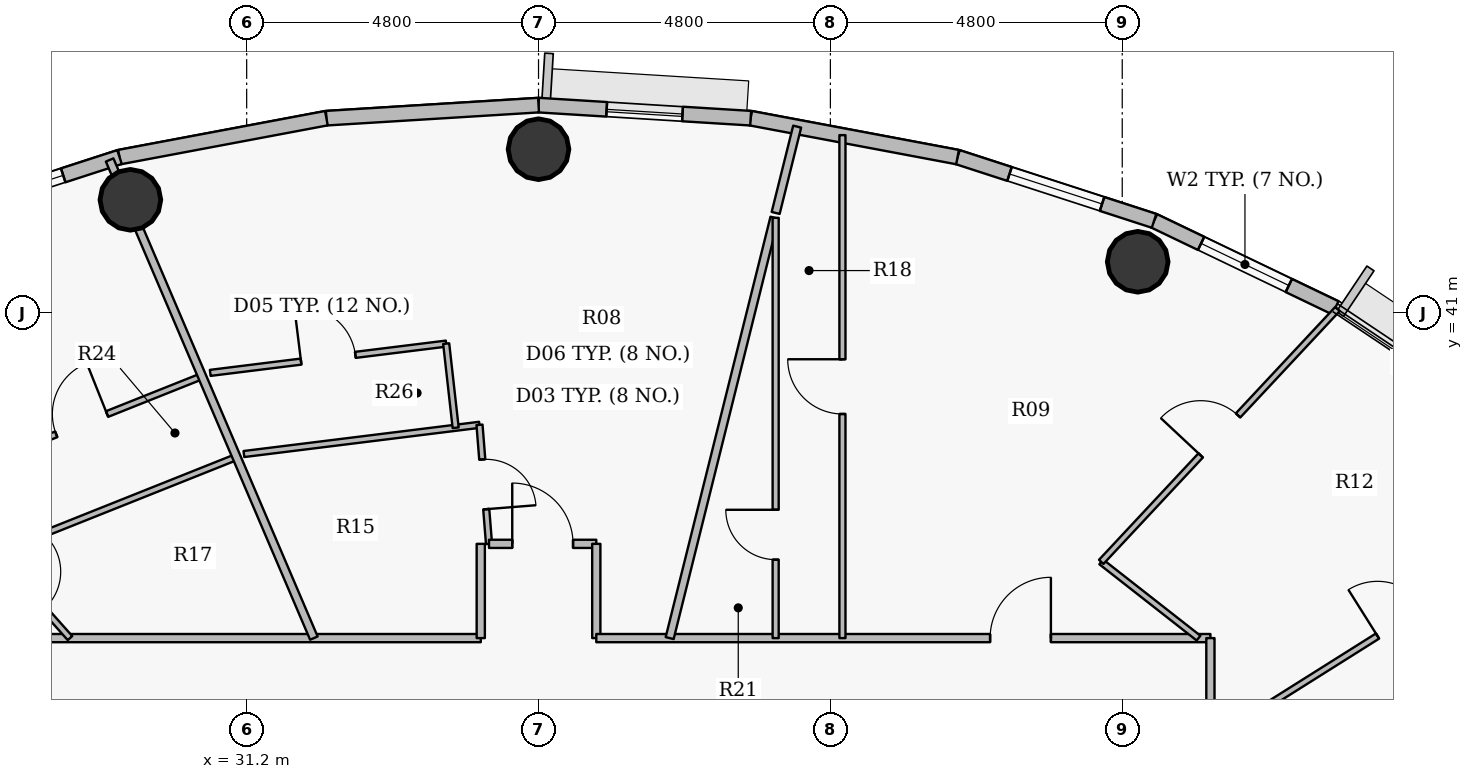
"""IFC4 building model, lengths in metres.
Left out: names, types, materials, properties, quantities, classifications, styles, units other than length and angle.
Written with IfcOpenShell. Run it as: python <this file> out.ifc"""

import sys

from ifc_helpers import new_model, si_unit, direction, frame, frame_2d, origin, origin_2d, place, context, subcontext, project, spatial, rectangle, hollow_circle, extrude, source, transform, mapped, element, fill, save


model = new_model("IFC4")
c1 = context("Model", 3, precision=1e-05, world=origin(), true_north=direction((0.0, 1.0)))
c2 = subcontext(c1, "Body", "Model", "MODEL_VIEW")
j1 = project(units=[si_unit("LENGTHUNIT", "METRE"), si_unit("PLANEANGLEUNIT", "RADIAN")], contexts=[c1])
p1 = place(None, origin())
s1 = spatial("IfcSite", under=j1, at=p1, CompositionType="ELEMENT")
p2 = place(p1, origin())
s2 = spatial("IfcBuilding", under=s1, at=p2, CompositionType="ELEMENT")
p3 = place(p2, frame((0.0, 0.0, 303.0)))
s3 = spatial("IfcBuildingStorey", under=s2, at=p3, CompositionType="ELEMENT", Elevation=303.0)
for number, where, z_axis, x_axis in (
    (1, (45.854, 41.839, 0.0), (0.0, 0.0, 1.0), (1.0, 0.0, 0.0)),
    (2, (36.0, 43.69, 0.0), (0.0, 0.0, 1.0), (1.0, 0.0, 0.0)),
    (3, (29.288, 42.858, 0.0), (0.0, 0.0, 1.0), (1.0, 0.0, 0.0)),
):
    element("IfcColumn", number, at=place(p3, frame(where, z_axis=z_axis, x_axis=x_axis)), inside=s3, PredefinedType="COLUMN", context=c2, shape_type="SweptSolid", body=[
        extrude(hollow_circle(Radius=0.5, WallThickness=0.032, at=origin_2d()), origin(), (0.0, 0.0, 1.0), 3.75),
    ])
p4 = place(p3, frame((46.123, 42.512, 0.0), z_axis=(0.0, 0.0, 1.0), x_axis=(0.901573741254, -0.43262546051, 0.0)))
e4 = element("IfcWall", 4, at=p4, inside=s3, PredefinedType="SOLIDWALL", context=c2, shape_type="SweptSolid", body=[
    extrude(rectangle(XDim=3.307, YDim=0.24, at=frame_2d((1.653, 0.0))), origin(), (0.0, 0.0, 1.0), 3.5),
])
p5 = place(p4, frame((0.858, 0.0, 0.9)))
e5 = element("IfcOpeningElement", 5, at=p5, cuts=e4, PredefinedType="OPENING", context=c2, shape_type="SweptSolid", body=[
    extrude(rectangle(XDim=1.6, YDim=1.75, at=origin_2d()), frame((0.8, 0.13, 0.875), z_axis=(0.0, -1.0, 0.0), x_axis=(1.0, 0.0, 0.0)), (0.0, 0.0, 1.0), 0.26),
])
p6 = place(p3, frame((42.891, 43.56, 0.0), z_axis=(0.0, 0.0, 1.0), x_axis=(0.95123136723, -0.308478339592, 0.0)))
e6 = element("IfcWall", 6, at=p6, inside=s3, PredefinedType="SOLIDWALL", context=c2, shape_type="SweptSolid", body=[
    extrude(rectangle(XDim=3.398, YDim=0.24, at=frame_2d((1.699, 0.0))), origin(), (0.0, 0.0, 1.0), 3.5),
])
p7 = place(p6, frame((0.899, 0.0, 0.9)))
e7 = element("IfcOpeningElement", 7, at=p7, cuts=e6, PredefinedType="OPENING", context=c2, shape_type="SweptSolid", body=[
    extrude(rectangle(XDim=1.6, YDim=1.75, at=origin_2d()), frame((0.8, 0.13, 0.875), z_axis=(0.0, -1.0, 0.0), x_axis=(1.0, 0.0, 0.0)), (0.0, 0.0, 1.0), 0.26),
])
p8 = place(p3, frame((39.489, 44.2, 0.0), z_axis=(0.0, 0.0, 1.0), x_axis=(0.982782655757, -0.184765395959, 0.0)))
e8 = element("IfcWall", 8, at=p8, inside=s3, PredefinedType="SOLIDWALL", context=c2, shape_type="SweptSolid", body=[
    extrude(rectangle(XDim=3.462, YDim=0.24, at=frame_2d((1.731, 0.0))), origin(), (0.0, 0.0, 1.0), 3.5),
])
p9 = place(p3, frame((36.0, 44.415, 0.0), z_axis=(0.0, 0.0, 1.0), x_axis=(0.998104946479, -0.061534671648, 0.0)))
e9 = element("IfcWall", 9, at=p9, inside=s3, PredefinedType="SOLIDWALL", context=c2, shape_type="SweptSolid", body=[
    extrude(rectangle(XDim=3.495, YDim=0.24, at=frame_2d((1.748, 0.0))), origin(), (0.0, 0.0, 1.0), 3.5),
])
p10 = place(p9, frame((1.123, 0.0, 0.9)))
e10 = element("IfcOpeningElement", 10, at=p10, cuts=e9, PredefinedType="OPENING", context=c2, shape_type="SweptSolid", body=[
    extrude(rectangle(XDim=1.25, YDim=1.65, at=origin_2d()), frame((0.625, 0.13, 0.825), z_axis=(0.0, -1.0, 0.0), x_axis=(1.0, 0.0, 0.0)), (0.0, 0.0, 1.0), 0.26),
])
p11 = place(p3, frame((32.511, 44.2, 0.0), z_axis=(0.0, 0.0, 1.0), x_axis=(0.998104946479, 0.061534671648, 0.0)))
e11 = element("IfcWall", 11, at=p11, inside=s3, PredefinedType="SOLIDWALL", context=c2, shape_type="SweptSolid", body=[
    extrude(rectangle(XDim=3.495, YDim=0.24, at=frame_2d((1.748, 0.0))), origin(), (0.0, 0.0, 1.0), 3.5),
])
p12 = place(p3, frame((29.109, 43.56, 0.0), z_axis=(0.0, 0.0, 1.0), x_axis=(0.982782655757, 0.184765395959, 0.0)))
e12 = element("IfcWall", 12, at=p12, inside=s3, PredefinedType="SOLIDWALL", context=c2, shape_type="SweptSolid", body=[
    extrude(rectangle(XDim=3.462, YDim=0.24, at=frame_2d((1.731, 0.0))), origin(), (0.0, 0.0, 1.0), 3.5),
])
p13 = place(p3, frame((25.877, 42.512, 0.0), z_axis=(0.0, 0.0, 1.0), x_axis=(0.95123136723, 0.308478339592, 0.0)))
e13 = element("IfcWall", 13, at=p13, inside=s3, PredefinedType="SOLIDWALL", context=c2, shape_type="SweptSolid", body=[
    extrude(rectangle(XDim=3.398, YDim=0.24, at=frame_2d((1.699, 0.0))), origin(), (0.0, 0.0, 1.0), 3.5),
])
p14 = place(p13, frame((0.824, 0.0, 0.9)))
e14 = element("IfcOpeningElement", 14, at=p14, cuts=e13, PredefinedType="OPENING", context=c2, shape_type="SweptSolid", body=[
    extrude(rectangle(XDim=1.6, YDim=1.75, at=origin_2d()), frame((0.8, 0.13, 0.875), z_axis=(0.0, -1.0, 0.0), x_axis=(1.0, 0.0, 0.0)), (0.0, 0.0, 1.0), 0.26),
])
p15 = place(p3, frame((24.95, 35.65, 0.0), z_axis=(0.0, 0.0, 1.0), x_axis=(1.0, 0.0, 0.0)))
e15 = element("IfcWall", 15, at=p15, inside=s3, PredefinedType="PARTITIONING", context=c2, shape_type="SweptSolid", body=[
    extrude(rectangle(XDim=10.1, YDim=0.135, at=frame_2d((5.05, 0.0))), origin(), (0.0, 0.0, 1.0), 3.035),
])
p16 = place(p15, frame((1.192, 0.0, 0.0)))
e16 = element("IfcOpeningElement", 16, at=p16, cuts=e15, PredefinedType="OPENING", context=c2, shape_type="SweptSolid", body=[
    extrude(rectangle(XDim=1.0, YDim=2.15, at=origin_2d()), frame((0.5, 0.078, 1.075), z_axis=(0.0, -1.0, 0.0), x_axis=(1.0, 0.0, 0.0)), (0.0, 0.0, 1.0), 0.155),
])
p17 = place(p3, frame((26.507, 38.378, 0.0), z_axis=(0.0, 0.0, 1.0), x_axis=(0.928788495711, 0.370610213345, 0.0)))
e17 = element("IfcWall", 17, at=p17, inside=s3, PredefinedType="PARTITIONING", context=c2, shape_type="SweptSolid", body=[
    extrude(rectangle(XDim=4.261, YDim=0.1, at=frame_2d((2.131, 0.0))), origin(), (0.0, 0.0, 1.0), 3.035),
])
p18 = place(p17, frame((1.681, 0.0, 0.0)))
e18 = element("IfcOpeningElement", 18, at=p18, cuts=e17, PredefinedType="OPENING", context=c2, shape_type="SweptSolid", body=[
    extrude(rectangle(XDim=0.9, YDim=2.1, at=origin_2d()), frame((0.45, 0.06, 1.05), z_axis=(0.0, -1.0, 0.0), x_axis=(1.0, 0.0, 0.0)), (0.0, 0.0, 1.0), 0.12),
])
p19 = place(p3, frame((27.055, 37.042, 0.0), z_axis=(0.0, 0.0, 1.0), x_axis=(0.665119722178, -0.746736737525, 0.0)))
e19 = element("IfcWall", 19, at=p19, inside=s3, PredefinedType="PARTITIONING", context=c2, shape_type="SweptSolid", body=[
    extrude(rectangle(XDim=1.864, YDim=0.1, at=frame_2d((0.932, 0.0))), origin(), (0.0, 0.0, 1.0), 3.5),
])
p20 = place(p19, frame((0.401, 0.0, 0.0)))
e20 = element("IfcOpeningElement", 20, at=p20, cuts=e19, PredefinedType="OPENING", context=c2, shape_type="SweptSolid", body=[
    extrude(rectangle(XDim=0.82, YDim=2.1, at=origin_2d()), frame((0.41, 0.06, 1.05), z_axis=(0.0, -1.0, 0.0), x_axis=(1.0, 0.0, 0.0)), (0.0, 0.0, 1.0), 0.12),
])
p21 = place(p3, frame((27.055, 37.042, 0.0), z_axis=(0.0, 0.0, 1.0), x_axis=(0.928814416372, 0.370545246819, 0.0)))
e21 = element("IfcWall", 21, at=p21, inside=s3, PredefinedType="PARTITIONING", context=c2, shape_type="SweptSolid", body=[
    extrude(rectangle(XDim=4.283, YDim=0.1, at=frame_2d((2.141, 0.0))), origin(), (0.0, 0.0, 1.0), 3.035),
])
p22 = place(p3, frame((28.946, 43.513, 0.0), z_axis=(0.0, 0.0, 1.0), x_axis=(0.392833513872, -0.919609607594, 0.0)))
e22 = element("IfcWall", 22, at=p22, inside=s3, PredefinedType="PARTITIONING", context=c2, shape_type="SweptSolid", body=[
    extrude(rectangle(XDim=8.55, YDim=0.135, at=frame_2d((4.275, 0.0))), origin(), (0.0, 0.0, 1.0), 3.035),
])
p23 = place(p3, frame((30.601, 40.011, 0.0), z_axis=(0.0, 0.0, 1.0), x_axis=(0.992391758007, 0.123120260886, 0.0)))
e23 = element("IfcWall", 23, at=p23, inside=s3, PredefinedType="PARTITIONING", context=c2, shape_type="SweptSolid", body=[
    extrude(rectangle(XDim=3.91, YDim=0.1, at=frame_2d((1.955, 0.0))), origin(), (0.0, 0.0, 1.0), 3.035),
])
p24 = place(p23, frame((1.505, 0.0, 0.0)))
e24 = element("IfcOpeningElement", 24, at=p24, cuts=e23, PredefinedType="OPENING", context=c2, shape_type="SweptSolid", body=[
    extrude(rectangle(XDim=0.9, YDim=2.1, at=origin_2d()), frame((0.45, 0.06, 1.05), z_axis=(0.0, -1.0, 0.0), x_axis=(1.0, 0.0, 0.0)), (0.0, 0.0, 1.0), 0.12),
])
p25 = place(p3, frame((31.155, 38.677, 0.0), z_axis=(0.0, 0.0, 1.0), x_axis=(0.992398620659, 0.123064932921, 0.0)))
e25 = element("IfcWall", 25, at=p25, inside=s3, PredefinedType="PARTITIONING", context=c2, shape_type="SweptSolid", body=[
    extrude(rectangle(XDim=3.904, YDim=0.1, at=frame_2d((1.952, 0.0))), origin(), (0.0, 0.0, 1.0), 3.035),
])
p26 = place(p3, frame((34.481, 40.493, 0.0), z_axis=(0.0, 0.0, 1.0), x_axis=(0.111835884353, -0.993726690278, 0.0)))
e26 = element("IfcWall", 26, at=p26, inside=s3, PredefinedType="PARTITIONING", context=c2, shape_type="SweptSolid", body=[
    extrude(rectangle(XDim=1.393, YDim=0.1, at=frame_2d((0.696, 0.0))), origin(), (0.0, 0.0, 1.0), 3.125),
])
p27 = place(p3, frame((35.029, 39.158, 0.0), z_axis=(0.0, 0.0, 1.0), x_axis=(0.079557473452, -0.996830280649, 0.0)))
e27 = element("IfcWall", 27, at=p27, inside=s3, PredefinedType="PARTITIONING", context=c2, shape_type="SweptSolid", body=[
    extrude(rectangle(XDim=1.964, YDim=0.1, at=frame_2d((0.982, 0.0))), origin(), (0.0, 0.0, 1.0), 3.5),
])
p28 = place(p27, frame((0.572, 0.0, 0.0)))
e28 = element("IfcOpeningElement", 28, at=p28, cuts=e27, PredefinedType="OPENING", context=c2, shape_type="SweptSolid", body=[
    extrude(rectangle(XDim=0.82, YDim=2.1, at=origin_2d()), frame((0.41, 0.06, 1.05), z_axis=(0.0, -1.0, 0.0), x_axis=(1.0, 0.0, 0.0)), (0.0, 0.0, 1.0), 0.12),
])
p29 = place(p3, frame((35.05, 35.65, 0.0), z_axis=(0.0, 0.0, 1.0), x_axis=(0.0, 1.0, 0.0)))
e29 = element("IfcWall", 29, at=p29, inside=s3, PredefinedType="PARTITIONING", context=c2, shape_type="SweptSolid", body=[
    extrude(rectangle(XDim=1.55, YDim=0.135, at=frame_2d((0.775, 0.0))), origin(), (0.0, 0.0, 1.0), 3.5),
])
p30 = place(p3, frame((35.186, 37.2, 0.0), z_axis=(0.0, 0.0, 1.0), x_axis=(1.0, 0.0, 0.0)))
e30 = element("IfcWall", 30, at=p30, inside=s3, PredefinedType="PARTITIONING", context=c2, shape_type="SweptSolid", body=[
    extrude(rectangle(XDim=1.764, YDim=0.135, at=frame_2d((0.882, 0.0))), origin(), (0.0, 0.0, 1.0), 3.035),
])
p31 = place(p30, frame((0.382, 0.0, 0.0)))
e31 = element("IfcOpeningElement", 31, at=p31, cuts=e30, PredefinedType="OPENING", context=c2, shape_type="SweptSolid", body=[
    extrude(rectangle(XDim=1.0, YDim=2.15, at=origin_2d()), frame((0.5, 0.078, 1.075), z_axis=(0.0, -1.0, 0.0), x_axis=(1.0, 0.0, 0.0)), (0.0, 0.0, 1.0), 0.155),
])
p32 = place(p3, frame((36.95, 35.65, 0.0), z_axis=(0.0, 0.0, 1.0), x_axis=(0.0, 1.0, 0.0)))
e32 = element("IfcWall", 32, at=p32, inside=s3, PredefinedType="PARTITIONING", context=c2, shape_type="SweptSolid", body=[
    extrude(rectangle(XDim=1.55, YDim=0.135, at=frame_2d((0.775, 0.0))), origin(), (0.0, 0.0, 1.0), 3.5),
])
p33 = place(p3, frame((36.95, 35.65, 0.0), z_axis=(0.0, 0.0, 1.0), x_axis=(1.0, 0.0, 0.0)))
e33 = element("IfcWall", 33, at=p33, inside=s3, PredefinedType="PARTITIONING", context=c2, shape_type="SweptSolid", body=[
    extrude(rectangle(XDim=10.1, YDim=0.135, at=frame_2d((5.05, 0.0))), origin(), (0.0, 0.0, 1.0), 3.035),
])
p34 = place(p33, frame((6.477, 0.0, 0.0)))
e34 = element("IfcOpeningElement", 34, at=p34, cuts=e33, PredefinedType="OPENING", context=c2, shape_type="SweptSolid", body=[
    extrude(rectangle(XDim=1.0, YDim=2.15, at=origin_2d()), frame((0.5, 0.078, 1.075), z_axis=(0.0, -1.0, 0.0), x_axis=(1.0, 0.0, 0.0)), (0.0, 0.0, 1.0), 0.155),
])
p35 = place(p3, frame((38.157, 35.65, 0.0), z_axis=(0.0, 0.0, 1.0), x_axis=(0.241898679066, 0.970301514513, 0.0)))
e35 = element("IfcWall", 35, at=p35, inside=s3, PredefinedType="PARTITIONING", context=c2, shape_type="SweptSolid", body=[
    extrude(rectangle(XDim=7.125, YDim=0.135, at=frame_2d((3.563, 0.0))), origin(), (0.0, 0.0, 1.0), 3.5),
])
p36 = place(p3, frame((39.9, 35.65, 0.0), z_axis=(0.0, 0.0, 1.0), x_axis=(0.0, 1.0, 0.0)))
e36 = element("IfcWall", 36, at=p36, inside=s3, PredefinedType="PARTITIONING", context=c2, shape_type="SweptSolid", body=[
    extrude(rectangle(XDim=6.911, YDim=0.1, at=frame_2d((3.456, 0.0))), origin(), (0.0, 0.0, 1.0), 3.5),
])
p37 = place(p36, frame((1.29, 0.0, 0.0)))
e37 = element("IfcOpeningElement", 37, at=p37, cuts=e36, PredefinedType="OPENING", context=c2, shape_type="SweptSolid", body=[
    extrude(rectangle(XDim=0.82, YDim=2.1, at=origin_2d()), frame((0.41, 0.06, 1.05), z_axis=(0.0, -1.0, 0.0), x_axis=(1.0, 0.0, 0.0)), (0.0, 0.0, 1.0), 0.12),
])
p38 = place(p3, frame((39.9, 42.642, 0.0), z_axis=(0.0, 0.0, 1.0), x_axis=(0.241985841386, 0.970279780563, 0.0)))
e38 = element("IfcWall", 38, at=p38, inside=s3, PredefinedType="PARTITIONING", context=c2, shape_type="SweptSolid", body=[
    extrude(rectangle(XDim=1.463, YDim=0.135, at=frame_2d((0.731, 0.0))), origin(), (0.0, 0.0, 1.0), 2.985),
])
p39 = place(p3, frame((40.998, 35.65, 0.0), z_axis=(0.0, 0.0, 1.0), x_axis=(0.0, 1.0, 0.0)))
e39 = element("IfcWall", 39, at=p39, inside=s3, PredefinedType="PARTITIONING", context=c2, shape_type="SweptSolid", body=[
    extrude(rectangle(XDim=8.271, YDim=0.1, at=frame_2d((4.136, 0.0))), origin(), (0.0, 0.0, 1.0), 2.985),
])
p40 = place(p39, frame((3.686, 0.0, 0.0)))
e40 = element("IfcOpeningElement", 40, at=p40, cuts=e39, PredefinedType="OPENING", context=c2, shape_type="SweptSolid", body=[
    extrude(rectangle(XDim=0.9, YDim=2.1, at=origin_2d()), frame((0.45, 0.06, 1.05), z_axis=(0.0, -1.0, 0.0), x_axis=(1.0, 0.0, 0.0)), (0.0, 0.0, 1.0), 0.12),
])
p41 = place(p3, frame((45.254, 36.904, 0.0), z_axis=(0.0, 0.0, 1.0), x_axis=(0.787350433025, -0.616505714179, 0.0)))
e41 = element("IfcWall", 41, at=p41, inside=s3, PredefinedType="PARTITIONING", context=c2, shape_type="SweptSolid", body=[
    extrude(rectangle(XDim=2.033, YDim=0.1, at=frame_2d((1.017, 0.0))), origin(), (0.0, 0.0, 1.0), 3.5),
])
p42 = place(p3, frame((45.254, 36.904, 0.0), z_axis=(0.0, 0.0, 1.0), x_axis=(0.682727638106, 0.73067295842, 0.0)))
e42 = element("IfcWall", 42, at=p42, inside=s3, PredefinedType="PARTITIONING", context=c2, shape_type="SweptSolid", body=[
    extrude(rectangle(XDim=5.693, YDim=0.1, at=frame_2d((2.846, 0.0))), origin(), (0.0, 0.0, 1.0), 2.985),
])
p43 = place(p42, frame((2.396, 0.0, 0.0)))
e43 = element("IfcOpeningElement", 43, at=p43, cuts=e42, PredefinedType="OPENING", context=c2, shape_type="SweptSolid", body=[
    extrude(rectangle(XDim=0.9, YDim=2.1, at=origin_2d()), frame((0.45, 0.06, 1.05), z_axis=(0.0, -1.0, 0.0), x_axis=(1.0, 0.0, 0.0)), (0.0, 0.0, 1.0), 0.12),
])
p44 = place(p3, frame((47.05, 18.35, 0.0), z_axis=(0.0, 0.0, 1.0), x_axis=(0.0, 1.0, 0.0)))
e44 = element("IfcWall", 44, at=p44, inside=s3, PredefinedType="PARTITIONING", context=c2, shape_type="SweptSolid", body=[
    extrude(rectangle(XDim=17.3, YDim=0.135, at=frame_2d((8.65, 0.0))), origin(), (0.0, 0.0, 1.0), 3.035),
])
p45 = place(p44, frame((6.155, 0.0, 0.0)))
e45 = element("IfcOpeningElement", 45, at=p45, cuts=e44, PredefinedType="OPENING", context=c2, shape_type="SweptSolid", body=[
    extrude(rectangle(XDim=1.0, YDim=2.15, at=origin_2d()), frame((0.5, 0.078, 1.075), z_axis=(0.0, -1.0, 0.0), x_axis=(1.0, 0.0, 0.0)), (0.0, 0.0, 1.0), 0.155),
])
p46 = place(p3, frame((47.05, 33.954, 0.0), z_axis=(0.0, 0.0, 1.0), x_axis=(0.846339777122, 0.532643390704, 0.0)))
e46 = element("IfcWall", 46, at=p46, inside=s3, PredefinedType="PARTITIONING", context=c2, shape_type="SweptSolid", body=[
    extrude(rectangle(XDim=7.395, YDim=0.1, at=frame_2d((3.698, 0.0))), origin(), (0.0, 0.0, 1.0), 2.985),
])
p47 = place(p46, frame((3.248, 0.0, 0.0)))
e47 = element("IfcOpeningElement", 47, at=p47, cuts=e46, PredefinedType="OPENING", context=c2, shape_type="SweptSolid", body=[
    extrude(rectangle(XDim=0.9, YDim=2.1, at=origin_2d()), frame((0.45, 0.06, 1.05), z_axis=(0.0, -1.0, 0.0), x_axis=(1.0, 0.0, 0.0)), (0.0, 0.0, 1.0), 0.12),
])
m1 = source(origin(), c2, "Body", "SweptSolid", [
    extrude(rectangle(XDim=1.6, YDim=1.75, at=origin_2d()), frame((0.8, 0.03, 0.875), z_axis=(0.0, -1.0, 0.0), x_axis=(1.0, 0.0, 0.0)), (0.0, 0.0, 1.0), 0.06),
])
p48 = place(p5, origin())
e48 = element("IfcWindow", 48, at=p48, inside=s3, PartitioningType="DOUBLE_PANEL_VERTICAL", PredefinedType="WINDOW", context=c2, shape_type="MappedRepresentation", body=[
    mapped(m1, transform((0.0, 0.0, 0.0), x_axis=(1.0, 0.0, 0.0), y_axis=(0.0, 1.0, 0.0), z_axis=(0.0, 0.0, 1.0), scale=1.0)),
])
fill(e5, e48)
p49 = place(p7, origin())
e49 = element("IfcWindow", 49, at=p49, inside=s3, PartitioningType="DOUBLE_PANEL_VERTICAL", PredefinedType="WINDOW", context=c2, shape_type="MappedRepresentation", body=[
    mapped(m1, transform((0.0, 0.0, 0.0), x_axis=(1.0, 0.0, 0.0), y_axis=(0.0, 1.0, 0.0), z_axis=(0.0, 0.0, 1.0), scale=1.0)),
])
fill(e7, e49)
p50 = place(p14, origin())
e50 = element("IfcWindow", 50, at=p50, inside=s3, PartitioningType="DOUBLE_PANEL_VERTICAL", PredefinedType="WINDOW", context=c2, shape_type="MappedRepresentation", body=[
    mapped(m1, transform((0.0, 0.0, 0.0), x_axis=(1.0, 0.0, 0.0), y_axis=(0.0, 1.0, 0.0), z_axis=(0.0, 0.0, 1.0), scale=1.0)),
])
fill(e14, e50)
m2 = source(origin(), c2, "Body", "SweptSolid", [
    extrude(rectangle(XDim=1.25, YDim=1.65, at=origin_2d()), frame((0.625, 0.03, 0.825), z_axis=(0.0, -1.0, 0.0), x_axis=(1.0, 0.0, 0.0)), (0.0, 0.0, 1.0), 0.06),
])
p51 = place(p10, origin())
e51 = element("IfcWindow", 51, at=p51, inside=s3, PartitioningType="SINGLE_PANEL", PredefinedType="WINDOW", context=c2, shape_type="MappedRepresentation", body=[
    mapped(m2, transform((0.0, 0.0, 0.0), x_axis=(1.0, 0.0, 0.0), y_axis=(0.0, 1.0, 0.0), z_axis=(0.0, 0.0, 1.0), scale=1.0)),
])
fill(e10, e51)
m3 = source(origin(), c2, "Body", "SweptSolid", [
    extrude(rectangle(XDim=1.0, YDim=2.15, at=origin_2d()), frame((0.5, 0.025, 1.075), z_axis=(0.0, -1.0, 0.0), x_axis=(1.0, 0.0, 0.0)), (0.0, 0.0, 1.0), 0.05),
])
p52 = place(p31, origin())
e52 = element("IfcDoor", 52, at=p52, inside=s3, OperationType="SINGLE_SWING_LEFT", PredefinedType="DOOR", context=c2, shape_type="MappedRepresentation", body=[
    mapped(m3, transform((0.0, 0.0, 0.0), x_axis=(1.0, 0.0, 0.0), y_axis=(0.0, 1.0, 0.0), z_axis=(0.0, 0.0, 1.0), scale=1.0)),
])
fill(e31, e52)
m4 = source(origin(), c2, "Body", "SweptSolid", [
    extrude(rectangle(XDim=0.82, YDim=2.1, at=origin_2d()), frame((0.41, 0.025, 1.05), z_axis=(0.0, -1.0, 0.0), x_axis=(1.0, 0.0, 0.0)), (0.0, 0.0, 1.0), 0.05),
])
p53 = place(p28, origin())
e53 = element("IfcDoor", 53, at=p53, inside=s3, OperationType="SINGLE_SWING_RIGHT", PredefinedType="DOOR", context=c2, shape_type="MappedRepresentation", body=[
    mapped(m4, transform((0.0, 0.0, 0.0), x_axis=(1.0, 0.0, 0.0), y_axis=(0.0, 1.0, 0.0), z_axis=(0.0, 0.0, 1.0), scale=1.0)),
])
fill(e28, e53)
m5 = source(origin(), c2, "Body", "SweptSolid", [
    extrude(rectangle(XDim=0.9, YDim=2.1, at=origin_2d()), frame((0.45, 0.025, 1.05), z_axis=(0.0, -1.0, 0.0), x_axis=(1.0, 0.0, 0.0)), (0.0, 0.0, 1.0), 0.05),
])
p54 = place(p24, origin())
e54 = element("IfcDoor", 54, at=p54, inside=s3, OperationType="SINGLE_SWING_LEFT", PredefinedType="DOOR", context=c2, shape_type="MappedRepresentation", body=[
    mapped(m5, transform((0.0, 0.0, 0.0), x_axis=(1.0, 0.0, 0.0), y_axis=(0.0, 1.0, 0.0), z_axis=(0.0, 0.0, 1.0), scale=1.0)),
])
fill(e24, e54)
p55 = place(p18, origin())
e55 = element("IfcDoor", 55, at=p55, inside=s3, OperationType="SINGLE_SWING_RIGHT", PredefinedType="DOOR", context=c2, shape_type="MappedRepresentation", body=[
    mapped(m5, transform((0.0, 0.0, 0.0), x_axis=(1.0, 0.0, 0.0), y_axis=(0.0, 1.0, 0.0), z_axis=(0.0, 0.0, 1.0), scale=1.0)),
])
fill(e18, e55)
p56 = place(p34, origin())
e56 = element("IfcDoor", 56, at=p56, inside=s3, OperationType="SINGLE_SWING_RIGHT", PredefinedType="DOOR", context=c2, shape_type="MappedRepresentation", body=[
    mapped(m3, transform((0.0, 0.0, 0.0), x_axis=(1.0, 0.0, 0.0), y_axis=(0.0, 1.0, 0.0), z_axis=(0.0, 0.0, 1.0), scale=1.0)),
])
fill(e34, e56)
p57 = place(p43, origin())
e57 = element("IfcDoor", 57, at=p57, inside=s3, OperationType="SINGLE_SWING_LEFT", PredefinedType="DOOR", context=c2, shape_type="MappedRepresentation", body=[
    mapped(m5, transform((0.0, 0.0, 0.0), x_axis=(1.0, 0.0, 0.0), y_axis=(0.0, 1.0, 0.0), z_axis=(0.0, 0.0, 1.0), scale=1.0)),
])
fill(e43, e57)
p58 = place(p40, origin())
e58 = element("IfcDoor", 58, at=p58, inside=s3, OperationType="SINGLE_SWING_RIGHT", PredefinedType="DOOR", context=c2, shape_type="MappedRepresentation", body=[
    mapped(m5, transform((0.0, 0.0, 0.0), x_axis=(1.0, 0.0, 0.0), y_axis=(0.0, 1.0, 0.0), z_axis=(0.0, 0.0, 1.0), scale=1.0)),
])
fill(e40, e58)
p59 = place(p47, origin())
e59 = element("IfcDoor", 59, at=p59, inside=s3, OperationType="SINGLE_SWING_LEFT", PredefinedType="DOOR", context=c2, shape_type="MappedRepresentation", body=[
    mapped(m5, transform((0.0, 0.0, 0.0), x_axis=(1.0, 0.0, 0.0), y_axis=(0.0, 1.0, 0.0), z_axis=(0.0, 0.0, 1.0), scale=1.0)),
])
fill(e47, e59)
p60 = place(p37, origin())
e60 = element("IfcDoor", 60, at=p60, inside=s3, OperationType="SINGLE_SWING_RIGHT", PredefinedType="DOOR", context=c2, shape_type="MappedRepresentation", body=[
    mapped(m4, transform((0.0, 0.0, 0.0), x_axis=(1.0, 0.0, 0.0), y_axis=(0.0, 1.0, 0.0), z_axis=(0.0, 0.0, 1.0), scale=1.0)),
])
fill(e37, e60)
save(model, sys.argv[1])
